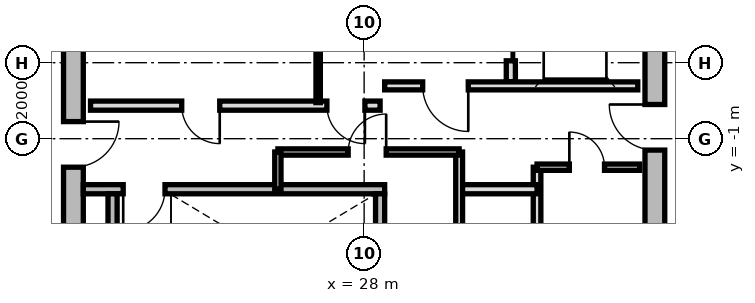
"""IFC4 building model, lengths in metres.
Left out: names, types, materials, properties, quantities, classifications, styles, units other than length and angle.
Written with IfcOpenShell. Run it as: python <this file> out.ifc"""

import sys

from ifc_helpers import new_model, si_unit, direction, frame, frame_2d, origin, place, context, subcontext, project, spatial, rectangle, extrude, source, transform, mapped, element, fill, save


model = new_model("IFC4")
c1 = context("Model", 3, precision=1e-05, world=origin(), true_north=direction((0.0, 1.0)))
c2 = subcontext(c1, "Body", "Model", "MODEL_VIEW")
j1 = project(units=[si_unit("LENGTHUNIT", "METRE"), si_unit("PLANEANGLEUNIT", "RADIAN")], contexts=[c1])
p1 = place(None, origin())
s1 = spatial("IfcSite", under=j1, at=p1, CompositionType="ELEMENT")
p2 = place(p1, origin())
s2 = spatial("IfcBuilding", under=s1, at=p2, CompositionType="ELEMENT")
p3 = place(p2, frame((0.0, 0.0, 244.4)))
s3 = spatial("IfcBuildingStorey", under=s2, at=p3, CompositionType="ELEMENT", Elevation=244.4)
m1 = source(origin(), c2, "Body", "SweptSolid", [
    extrude(rectangle(XDim=11.1, YDim=0.52, at=frame_2d((5.55, 0.0))), origin(), (0.0, 0.0, 1.0), 5.175),
])
p4 = place(p3, frame((20.35, -5.55, 0.0), z_axis=(0.0, 0.0, 1.0), x_axis=(0.0, 1.0, 0.0)))
e1 = element("IfcWall", 1, at=p4, inside=s3, PredefinedType="SHEAR", context=c2, shape_type="MappedRepresentation", body=[
    mapped(m1, transform((0.0, 0.0, 0.0), x_axis=(1.0, 0.0, 0.0), y_axis=(0.0, 1.0, 0.0), z_axis=(0.0, 0.0, 1.0), scale=1.0)),
])
p5 = place(p4, frame((3.8, 0.0, 0.0)))
e2 = element("IfcOpeningElement", 2, at=p5, cuts=e1, PredefinedType="OPENING", context=c2, shape_type="SweptSolid", body=[
    extrude(rectangle(XDim=1.2, YDim=2.15, at=frame_2d((0.6, 1.075))), frame((0.0, 0.27, 0.0), z_axis=(0.0, -1.0, 0.0), x_axis=(1.0, 0.0, 0.0)), (0.0, 0.0, 1.0), 0.54),
])
p6 = place(p3, frame((35.65, 5.55, 0.0), z_axis=(0.0, 0.0, 1.0), x_axis=(0.0, -1.0, 0.0)))
e3 = element("IfcWall", 3, at=p6, inside=s3, PredefinedType="SHEAR", context=c2, shape_type="MappedRepresentation", body=[
    mapped(m1, transform((0.0, 0.0, 0.0), x_axis=(1.0, 0.0, 0.0), y_axis=(0.0, 1.0, 0.0), z_axis=(0.0, 0.0, 1.0), scale=1.0)),
])
p7 = place(p6, frame((5.65, 0.0, 0.0)))
e4 = element("IfcOpeningElement", 4, at=p7, cuts=e3, PredefinedType="OPENING", context=c2, shape_type="SweptSolid", body=[
    extrude(rectangle(XDim=1.2, YDim=2.15, at=frame_2d((0.6, 1.075))), frame((0.0, 0.27, 0.0), z_axis=(0.0, -1.0, 0.0), x_axis=(1.0, 0.0, 0.0)), (0.0, 0.0, 1.0), 0.54),
])
p8 = place(p6, frame((9.3, 0.0, 0.0)))
e5 = element("IfcOpeningElement", 5, at=p8, cuts=e3, PredefinedType="OPENING", context=c2, shape_type="SweptSolid", body=[
    extrude(rectangle(XDim=1.0, YDim=2.1, at=frame_2d((0.5, 1.05))), frame((0.0, 0.27, 0.0), z_axis=(0.0, -1.0, 0.0), x_axis=(1.0, 0.0, 0.0)), (0.0, 0.0, 1.0), 0.54),
])
m2 = source(origin(), c2, "Body", "SweptSolid", [
    extrude(rectangle(XDim=7.93, YDim=0.24, at=frame_2d((3.965, 0.0))), origin(), (0.0, 0.0, 1.0), 5.175),
])
p9 = place(p3, frame((20.61, -2.33, 0.0), z_axis=(0.0, 0.0, 1.0), x_axis=(1.0, 0.0, 0.0)))
e6 = element("IfcWall", 6, at=p9, inside=s3, PredefinedType="PARTITIONING", context=c2, shape_type="MappedRepresentation", body=[
    mapped(m2, transform((0.0, 0.0, 0.0), x_axis=(1.0, 0.0, 0.0), y_axis=(0.0, 1.0, 0.0), z_axis=(0.0, 0.0, 1.0), scale=1.0)),
])
p10 = place(p9, frame((1.05, 0.0, 0.0)))
e7 = element("IfcOpeningElement", 7, at=p10, cuts=e6, PredefinedType="OPENING", context=c2, shape_type="SweptSolid", body=[
    extrude(rectangle(XDim=1.1, YDim=2.15, at=frame_2d((0.55, 1.075))), frame((0.0, 0.13, 0.0), z_axis=(0.0, -1.0, 0.0), x_axis=(1.0, 0.0, 0.0)), (0.0, 0.0, 1.0), 0.26),
])
m3 = source(origin(), c2, "Body", "SweptSolid", [
    extrude(rectangle(XDim=3.24, YDim=0.24, at=frame_2d((1.62, 0.0))), origin(), (0.0, 0.0, 1.0), 5.175),
])
for number, where, z_axis, x_axis in (
    (8, (21.38, -5.69, 0.0), (0.0, 0.0, 1.0), (0.0, 1.0, 0.0)),
    (9, (28.42, -5.69, 0.0), (0.0, 0.0, 1.0), (0.0, 1.0, 0.0)),
):
    element("IfcWall", number, at=place(p3, frame(where, z_axis=z_axis, x_axis=x_axis)), inside=s3, PredefinedType="PARTITIONING", context=c2, shape_type="MappedRepresentation", body=[
        mapped(m3, transform((0.0, 0.0, 0.0), x_axis=(1.0, 0.0, 0.0), y_axis=(0.0, 1.0, 0.0), z_axis=(0.0, 0.0, 1.0), scale=1.0)),
    ])
m4 = source(origin(), c2, "Body", "SweptSolid", [
    extrude(rectangle(XDim=5.0, YDim=0.24, at=frame_2d((2.5, 0.0))), origin(), (0.0, 0.0, 1.0), 5.16),
])
p11 = place(p3, frame((31.86, 0.5, 0.0), z_axis=(0.0, 0.0, 1.0), x_axis=(0.0, 1.0, 0.0)))
e10 = element("IfcWall", 10, at=p11, inside=s3, PredefinedType="PARTITIONING", context=c2, shape_type="MappedRepresentation", body=[
    mapped(m4, transform((0.0, 0.0, 0.0), x_axis=(1.0, 0.0, 0.0), y_axis=(0.0, 1.0, 0.0), z_axis=(0.0, 0.0, 1.0), scale=1.0)),
])
p12 = place(p11, frame((3.05, 0.0, 0.0)))
e11 = element("IfcOpeningElement", 11, at=p12, cuts=e10, PredefinedType="OPENING", context=c2, shape_type="SweptSolid", body=[
    extrude(rectangle(XDim=1.3, YDim=2.2, at=frame_2d((0.65, 1.1))), frame((0.0, 0.13, 0.0), z_axis=(0.0, -1.0, 0.0), x_axis=(1.0, 0.0, 0.0)), (0.0, 0.0, 1.0), 0.26),
])
p13 = place(p11, frame((0.55, 0.0, 0.0)))
e12 = element("IfcOpeningElement", 12, at=p13, cuts=e10, PredefinedType="OPENING", context=c2, shape_type="SweptSolid", body=[
    extrude(rectangle(XDim=1.3, YDim=2.2, at=frame_2d((0.65, 1.1))), frame((0.0, 0.13, 0.0), z_axis=(0.0, -1.0, 0.0), x_axis=(1.0, 0.0, 0.0)), (0.0, 0.0, 1.0), 0.26),
])
m5 = source(origin(), c2, "Body", "SweptSolid", [
    extrude(rectangle(XDim=6.66, YDim=0.21, at=frame_2d((3.33, 0.0))), origin(), (0.0, 0.0, 1.0), 5.16),
])
p14 = place(p3, frame((28.54, 0.39, 0.0), z_axis=(0.0, 0.0, 1.0), x_axis=(1.0, 0.0, 0.0)))
e13 = element("IfcWall", 13, at=p14, inside=s3, PredefinedType="PARTITIONING", context=c2, shape_type="MappedRepresentation", body=[
    mapped(m5, transform((0.0, 0.0, 0.0), x_axis=(1.0, 0.0, 0.0), y_axis=(0.0, 1.0, 0.0), z_axis=(0.0, 0.0, 1.0), scale=1.0)),
])
p15 = place(p14, frame((1.0, 0.0, 0.0)))
e14 = element("IfcOpeningElement", 14, at=p15, cuts=e13, PredefinedType="OPENING", context=c2, shape_type="SweptSolid", body=[
    extrude(rectangle(XDim=1.2, YDim=2.15, at=frame_2d((0.6, 1.075))), frame((0.0, 0.115, 0.0), z_axis=(0.0, -1.0, 0.0), x_axis=(1.0, 0.0, 0.0)), (0.0, 0.0, 1.0), 0.23),
])
m6 = source(origin(), c2, "Body", "SweptSolid", [
    extrude(rectangle(XDim=7.62, YDim=0.24, at=frame_2d((3.81, 0.0))), origin(), (0.0, 0.0, 1.0), 5.16),
])
p16 = place(p3, frame((20.8, -0.13, 0.0), z_axis=(0.0, 0.0, 1.0), x_axis=(1.0, 0.0, 0.0)))
e15 = element("IfcWall", 15, at=p16, inside=s3, PredefinedType="PARTITIONING", context=c2, shape_type="MappedRepresentation", body=[
    mapped(m6, transform((0.0, 0.0, 0.0), x_axis=(1.0, 0.0, 0.0), y_axis=(0.0, 1.0, 0.0), z_axis=(0.0, 0.0, 1.0), scale=1.0)),
])
p17 = place(p16, frame((6.22, 0.0, 0.0)))
e16 = element("IfcOpeningElement", 16, at=p17, cuts=e15, PredefinedType="OPENING", context=c2, shape_type="SweptSolid", body=[
    extrude(rectangle(XDim=1.0, YDim=2.1, at=frame_2d((0.5, 1.05))), frame((0.0, 0.13, 0.0), z_axis=(0.0, -1.0, 0.0), x_axis=(1.0, 0.0, 0.0)), (0.0, 0.0, 1.0), 0.26),
])
p18 = place(p16, frame((2.4, 0.0, 0.0)))
e17 = element("IfcOpeningElement", 17, at=p18, cuts=e15, PredefinedType="OPENING", context=c2, shape_type="SweptSolid", body=[
    extrude(rectangle(XDim=1.0, YDim=2.1, at=frame_2d((0.5, 1.05))), frame((0.0, 0.13, 0.0), z_axis=(0.0, -1.0, 0.0), x_axis=(1.0, 0.0, 0.0)), (0.0, 0.0, 1.0), 0.26),
])
m7 = source(origin(), c2, "Body", "SweptSolid", [
    extrude(rectangle(XDim=2.33, YDim=0.115, at=frame_2d((1.165, 0.0))), origin(), (0.0, 0.0, 1.0), 5.16),
])
p19 = place(p3, frame((26.79, -0.05, 0.0), z_axis=(0.0, 0.0, 1.0), x_axis=(0.0, 1.0, 0.0)))
e18 = element("IfcWall", 18, at=p19, inside=s3, PredefinedType="PARTITIONING", context=c2, shape_type="MappedRepresentation", body=[
    mapped(m7, transform((0.0, 0.0, 0.0), x_axis=(1.0, 0.0, 0.0), y_axis=(0.0, 1.0, 0.0), z_axis=(0.0, 0.0, 1.0), scale=1.0)),
])
m8 = source(origin(), c2, "Body", "SweptSolid", [
    extrude(rectangle(XDim=3.8, YDim=0.2, at=frame_2d((1.9, 0.0))), origin(), (0.0, 0.0, 1.0), 5.16),
])
p20 = place(p3, frame((32.55, -5.55, 0.0), z_axis=(0.0, 0.0, 1.0), x_axis=(0.0, 1.0, 0.0)))
e19 = element("IfcWall", 19, at=p20, inside=s3, PredefinedType="PARTITIONING", context=c2, shape_type="MappedRepresentation", body=[
    mapped(m8, transform((0.0, 0.0, 0.0), x_axis=(1.0, 0.0, 0.0), y_axis=(0.0, 1.0, 0.0), z_axis=(0.0, 0.0, 1.0), scale=1.0)),
])
m9 = source(origin(), c2, "Body", "SweptSolid", [
    extrude(rectangle(XDim=2.05, YDim=0.24, at=frame_2d((1.025, 0.0))), origin(), (0.0, 0.0, 1.0), 5.16),
])
p21 = place(p3, frame((30.5, -2.33, 0.0), z_axis=(0.0, 0.0, 1.0), x_axis=(1.0, 0.0, 0.0)))
e20 = element("IfcWall", 20, at=p21, inside=s3, PredefinedType="PARTITIONING", context=c2, shape_type="MappedRepresentation", body=[
    mapped(m9, transform((0.0, 0.0, 0.0), x_axis=(1.0, 0.0, 0.0), y_axis=(0.0, 1.0, 0.0), z_axis=(0.0, 0.0, 1.0), scale=1.0)),
])
m10 = source(origin(), c2, "Body", "SweptSolid", [
    extrude(rectangle(XDim=4.2, YDim=0.18, at=frame_2d((2.1, 0.0))), origin(), (0.0, 0.0, 1.0), 5.16),
])
p22 = place(p3, frame((30.5, -5.55, 0.0), z_axis=(0.0, 0.0, 1.0), x_axis=(0.0, 1.0, 0.0)))
e21 = element("IfcWall", 21, at=p22, inside=s3, PredefinedType="PARTITIONING", context=c2, shape_type="MappedRepresentation", body=[
    mapped(m10, transform((0.0, 0.0, 0.0), x_axis=(1.0, 0.0, 0.0), y_axis=(0.0, 1.0, 0.0), z_axis=(0.0, 0.0, 1.0), scale=1.0)),
])
m11 = source(origin(), c2, "Body", "SweptSolid", [
    extrude(rectangle(XDim=4.77, YDim=0.165, at=frame_2d((2.385, 0.0))), origin(), (0.0, 0.0, 1.0), 5.16),
])
p23 = place(p3, frame((25.73, -1.35, 0.0), z_axis=(0.0, 0.0, 1.0), x_axis=(1.0, 0.0, 0.0)))
e22 = element("IfcWall", 22, at=p23, inside=s3, PredefinedType="PARTITIONING", context=c2, shape_type="MappedRepresentation", body=[
    mapped(m11, transform((0.0, 0.0, 0.0), x_axis=(1.0, 0.0, 0.0), y_axis=(0.0, 1.0, 0.0), z_axis=(0.0, 0.0, 1.0), scale=1.0)),
])
p24 = place(p23, frame((1.85, 0.0, 0.0)))
e23 = element("IfcOpeningElement", 23, at=p24, cuts=e22, PredefinedType="OPENING", context=c2, shape_type="SweptSolid", body=[
    extrude(rectangle(XDim=1.0, YDim=2.1, at=frame_2d((0.5, 1.05))), frame((0.0, 0.093, 0.0), z_axis=(0.0, -1.0, 0.0), x_axis=(1.0, 0.0, 0.0)), (0.0, 0.0, 1.0), 0.185),
])
m12 = source(origin(), c2, "Body", "SweptSolid", [
    extrude(rectangle(XDim=0.98, YDim=0.165, at=frame_2d((0.49, 0.0))), origin(), (0.0, 0.0, 1.0), 5.16),
])
p25 = place(p3, frame((25.73, -2.33, 0.0), z_axis=(0.0, 0.0, 1.0), x_axis=(0.0, 1.0, 0.0)))
e24 = element("IfcWall", 24, at=p25, inside=s3, PredefinedType="PARTITIONING", context=c2, shape_type="MappedRepresentation", body=[
    mapped(m12, transform((0.0, 0.0, 0.0), x_axis=(1.0, 0.0, 0.0), y_axis=(0.0, 1.0, 0.0), z_axis=(0.0, 0.0, 1.0), scale=1.0)),
])
m13 = source(origin(), c2, "Body", "SweptSolid", [
    extrude(rectangle(XDim=2.7, YDim=0.165, at=frame_2d((1.35, 0.0))), origin(), (0.0, 0.0, 1.0), 5.16),
])
p26 = place(p3, frame((32.55, -1.75, 0.0), z_axis=(0.0, 0.0, 1.0), x_axis=(1.0, 0.0, 0.0)))
e25 = element("IfcWall", 25, at=p26, inside=s3, PredefinedType="PARTITIONING", context=c2, shape_type="MappedRepresentation", body=[
    mapped(m13, transform((0.0, 0.0, 0.0), x_axis=(1.0, 0.0, 0.0), y_axis=(0.0, 1.0, 0.0), z_axis=(0.0, 0.0, 1.0), scale=1.0)),
])
p27 = place(p26, frame((0.85, 0.0, 0.0)))
e26 = element("IfcOpeningElement", 26, at=p27, cuts=e25, PredefinedType="OPENING", context=c2, shape_type="SweptSolid", body=[
    extrude(rectangle(XDim=0.925, YDim=2.1, at=frame_2d((0.462, 1.05))), frame((0.0, 0.093, 0.0), z_axis=(0.0, -1.0, 0.0), x_axis=(1.0, 0.0, 0.0)), (0.0, 0.0, 1.0), 0.185),
])
m14 = source(origin(), c2, "Body", "SweptSolid", [
    extrude(rectangle(XDim=1.1, YDim=2.15, at=frame_2d((0.55, 1.075))), frame((0.0, 0.025, 0.0), z_axis=(0.0, -1.0, 0.0), x_axis=(1.0, 0.0, 0.0)), (0.0, 0.0, 1.0), 0.05),
])
p28 = place(p10, frame((1.1, 0.0, 0.0), z_axis=(0.0, 0.0, 1.0), x_axis=(-1.0, 0.0, 0.0)))
e27 = element("IfcDoor", 27, at=p28, inside=s3, OperationType="SINGLE_SWING_RIGHT", PredefinedType="DOOR", context=c2, shape_type="MappedRepresentation", body=[
    mapped(m14, transform((0.0, 0.0, 0.0), x_axis=(1.0, 0.0, 0.0), y_axis=(0.0, 1.0, 0.0), z_axis=(0.0, 0.0, 1.0), scale=1.0)),
])
fill(e7, e27)
m15 = source(origin(), c2, "Body", "SweptSolid", [
    extrude(rectangle(XDim=1.3, YDim=2.2, at=frame_2d((0.65, 1.1))), frame((0.0, 0.025, 0.0), z_axis=(0.0, -1.0, 0.0), x_axis=(1.0, 0.0, 0.0)), (0.0, 0.0, 1.0), 0.05),
])
p29 = place(p13, origin())
e28 = element("IfcDoor", 28, at=p29, inside=s3, OperationType="SLIDING_TO_RIGHT", PredefinedType="DOOR", context=c2, shape_type="MappedRepresentation", body=[
    mapped(m15, transform((0.0, 0.0, 0.0), x_axis=(1.0, 0.0, 0.0), y_axis=(0.0, 1.0, 0.0), z_axis=(0.0, 0.0, 1.0), scale=1.0)),
])
fill(e12, e28)
m16 = source(origin(), c2, "Body", "SweptSolid", [
    extrude(rectangle(XDim=1.2, YDim=2.15, at=frame_2d((0.6, 1.075))), frame((0.0, 0.025, 0.0), z_axis=(0.0, -1.0, 0.0), x_axis=(1.0, 0.0, 0.0)), (0.0, 0.0, 1.0), 0.05),
])
p30 = place(p15, frame((1.2, 0.0, 0.0), z_axis=(0.0, 0.0, 1.0), x_axis=(-1.0, 0.0, 0.0)))
e29 = element("IfcDoor", 29, at=p30, inside=s3, OperationType="SINGLE_SWING_LEFT", PredefinedType="DOOR", context=c2, shape_type="MappedRepresentation", body=[
    mapped(m16, transform((0.0, 0.0, 0.0), x_axis=(1.0, 0.0, 0.0), y_axis=(0.0, 1.0, 0.0), z_axis=(0.0, 0.0, 1.0), scale=1.0)),
])
fill(e14, e29)
p31 = place(p5, frame((1.2, 0.0, 0.0), z_axis=(0.0, 0.0, 1.0), x_axis=(-1.0, 0.0, 0.0)))
e30 = element("IfcDoor", 30, at=p31, inside=s3, OperationType="SINGLE_SWING_LEFT", PredefinedType="DOOR", context=c2, shape_type="MappedRepresentation", body=[
    mapped(m16, transform((0.0, 0.0, 0.0), x_axis=(1.0, 0.0, 0.0), y_axis=(0.0, 1.0, 0.0), z_axis=(0.0, 0.0, 1.0), scale=1.0)),
])
fill(e2, e30)
p32 = place(p7, frame((1.2, 0.0, 0.0), z_axis=(0.0, 0.0, 1.0), x_axis=(-1.0, 0.0, 0.0)))
e31 = element("IfcDoor", 31, at=p32, inside=s3, OperationType="SINGLE_SWING_RIGHT", PredefinedType="DOOR", context=c2, shape_type="MappedRepresentation", body=[
    mapped(m16, transform((0.0, 0.0, 0.0), x_axis=(1.0, 0.0, 0.0), y_axis=(0.0, 1.0, 0.0), z_axis=(0.0, 0.0, 1.0), scale=1.0)),
])
fill(e4, e31)
m17 = source(origin(), c2, "Body", "SweptSolid", [
    extrude(rectangle(XDim=1.0, YDim=2.1, at=frame_2d((0.5, 1.05))), frame((0.0, 0.025, 0.0), z_axis=(0.0, -1.0, 0.0), x_axis=(1.0, 0.0, 0.0)), (0.0, 0.0, 1.0), 0.05),
])
p33 = place(p17, frame((1.0, 0.0, 0.0), z_axis=(0.0, 0.0, 1.0), x_axis=(-1.0, 0.0, 0.0)))
e32 = element("IfcDoor", 32, at=p33, inside=s3, OperationType="SINGLE_SWING_LEFT", PredefinedType="DOOR", context=c2, shape_type="MappedRepresentation", body=[
    mapped(m17, transform((0.0, 0.0, 0.0), x_axis=(1.0, 0.0, 0.0), y_axis=(0.0, 1.0, 0.0), z_axis=(0.0, 0.0, 1.0), scale=1.0)),
])
fill(e16, e32)
p34 = place(p18, frame((1.0, 0.0, 0.0), z_axis=(0.0, 0.0, 1.0), x_axis=(-1.0, 0.0, 0.0)))
e33 = element("IfcDoor", 33, at=p34, inside=s3, OperationType="SINGLE_SWING_LEFT", PredefinedType="DOOR", context=c2, shape_type="MappedRepresentation", body=[
    mapped(m17, transform((0.0, 0.0, 0.0), x_axis=(1.0, 0.0, 0.0), y_axis=(0.0, 1.0, 0.0), z_axis=(0.0, 0.0, 1.0), scale=1.0)),
])
fill(e17, e33)
p35 = place(p24, origin())
e34 = element("IfcDoor", 34, at=p35, inside=s3, OperationType="SINGLE_SWING_RIGHT", PredefinedType="DOOR", context=c2, shape_type="MappedRepresentation", body=[
    mapped(m17, transform((0.0, 0.0, 0.0), x_axis=(1.0, 0.0, 0.0), y_axis=(0.0, 1.0, 0.0), z_axis=(0.0, 0.0, 1.0), scale=1.0)),
])
fill(e23, e34)
m18 = source(origin(), c2, "Body", "SweptSolid", [
    extrude(rectangle(XDim=0.925, YDim=2.1, at=frame_2d((0.462, 1.05))), frame((0.0, 0.025, 0.0), z_axis=(0.0, -1.0, 0.0), x_axis=(1.0, 0.0, 0.0)), (0.0, 0.0, 1.0), 0.05),
])
p36 = place(p27, origin())
e35 = element("IfcDoor", 35, at=p36, inside=s3, OperationType="SINGLE_SWING_LEFT", PredefinedType="DOOR", context=c2, shape_type="MappedRepresentation", body=[
    mapped(m18, transform((0.0, 0.0, 0.0), x_axis=(1.0, 0.0, 0.0), y_axis=(0.0, 1.0, 0.0), z_axis=(0.0, 0.0, 1.0), scale=1.0)),
])
fill(e26, e35)
save(model, sys.argv[1])
